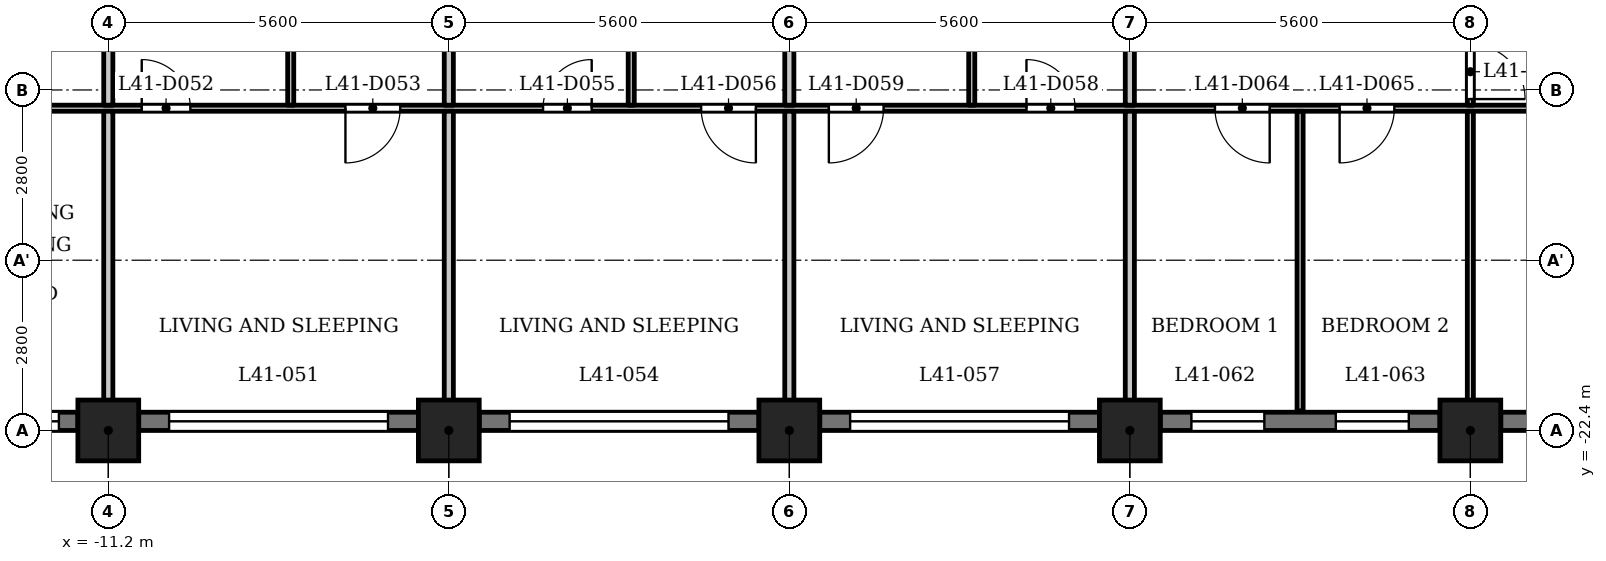
"""IFC4 building model, lengths in metres.
Left out: names, types, materials, properties, quantities, classifications, styles, units other than length and angle.
Written with IfcOpenShell. Run it as: python <this file> out.ifc"""

import sys

from ifc_helpers import new_model, si_unit, direction, frame, frame_2d, origin, origin_2d, place, context, subcontext, project, spatial, rectangle, extrude, element, fill, save


model = new_model("IFC4")
c1 = context("Model", 3, precision=1e-05, world=origin(), true_north=direction((0.0, 1.0)))
c2 = subcontext(c1, "Body", "Model", "MODEL_VIEW")
j1 = project(units=[si_unit("LENGTHUNIT", "METRE"), si_unit("PLANEANGLEUNIT", "RADIAN")], contexts=[c1])
p1 = place(None, origin())
s1 = spatial("IfcSite", under=j1, at=p1, CompositionType="ELEMENT")
p2 = place(p1, origin())
s2 = spatial("IfcBuilding", under=s1, at=p2, CompositionType="ELEMENT")
p3 = place(p2, frame((0.0, 0.0, 160.6)))
s3 = spatial("IfcBuildingStorey", under=s2, at=p3, CompositionType="ELEMENT", Elevation=160.6)
for number, where, z_axis, x_axis in (
    (1, (-11.2, -22.4, 0.0), (0.0, 0.0, 1.0), (1.0, 0.0, 0.0)),
    (2, (-5.6, -22.4, 0.0), (0.0, 0.0, 1.0), (1.0, 0.0, 0.0)),
    (3, (0.0, -22.4, 0.0), (0.0, 0.0, 1.0), (1.0, 0.0, 0.0)),
    (4, (5.6, -22.4, 0.0), (0.0, 0.0, 1.0), (1.0, 0.0, 0.0)),
    (5, (11.2, -22.4, 0.0), (0.0, 0.0, 1.0), (1.0, 0.0, 0.0)),
):
    element("IfcColumn", number, at=place(p3, frame(where, z_axis=z_axis, x_axis=x_axis)), inside=s3, PredefinedType="COLUMN", context=c2, shape_type="SweptSolid", body=[
        extrude(rectangle(XDim=1.0, YDim=1.0, at=origin_2d()), origin(), (0.0, 0.0, 1.0), 3.5),
    ])
p4 = place(p3, frame((-16.3, -22.25, 0.0), z_axis=(0.0, 0.0, 1.0), x_axis=(1.0, 0.0, 0.0)))
e6 = element("IfcWall", 6, at=p4, inside=s3, PredefinedType="SOLIDWALL", context=c2, shape_type="SweptSolid", body=[
    extrude(rectangle(XDim=4.6, YDim=0.3, at=frame_2d((2.3, 0.0))), origin(), (0.0, 0.0, 1.0), 2.45),
])
p5 = place(p4, frame((0.413, 0.0, 0.6)))
e7 = element("IfcOpeningElement", 7, at=p5, cuts=e6, PredefinedType="OPENING", context=c2, shape_type="SweptSolid", body=[
    extrude(rectangle(XDim=1.2, YDim=1.55, at=frame_2d((0.6, 0.775))), frame((0.0, 0.16, 0.0), z_axis=(0.0, -1.0, 0.0), x_axis=(1.0, 0.0, 0.0)), (0.0, 0.0, 1.0), 0.32),
])
p6 = place(p4, frame((2.488, 0.0, 0.9)))
e8 = element("IfcOpeningElement", 8, at=p6, cuts=e6, PredefinedType="OPENING", context=c2, shape_type="SweptSolid", body=[
    extrude(rectangle(XDim=1.8, YDim=1.25, at=frame_2d((0.9, 0.625))), frame((0.0, 0.16, 0.0), z_axis=(0.0, -1.0, 0.0), x_axis=(1.0, 0.0, 0.0)), (0.0, 0.0, 1.0), 0.32),
])
p7 = place(p3, frame((-10.7, -22.25, 0.0), z_axis=(0.0, 0.0, 1.0), x_axis=(1.0, 0.0, 0.0)))
e9 = element("IfcWall", 9, at=p7, inside=s3, PredefinedType="SOLIDWALL", context=c2, shape_type="SweptSolid", body=[
    extrude(rectangle(XDim=4.6, YDim=0.3, at=frame_2d((2.3, 0.0))), origin(), (0.0, 0.0, 1.0), 2.45),
])
p8 = place(p7, frame((0.5, 0.0, 1.2)))
e10 = element("IfcOpeningElement", 10, at=p8, cuts=e9, PredefinedType="OPENING", context=c2, shape_type="SweptSolid", body=[
    extrude(rectangle(XDim=3.6, YDim=0.95, at=frame_2d((1.8, 0.475))), frame((0.0, 0.16, 0.0), z_axis=(0.0, -1.0, 0.0), x_axis=(1.0, 0.0, 0.0)), (0.0, 0.0, 1.0), 0.32),
])
p9 = place(p3, frame((-5.1, -22.25, 0.0), z_axis=(0.0, 0.0, 1.0), x_axis=(1.0, 0.0, 0.0)))
e11 = element("IfcWall", 11, at=p9, inside=s3, PredefinedType="SOLIDWALL", context=c2, shape_type="SweptSolid", body=[
    extrude(rectangle(XDim=4.6, YDim=0.3, at=frame_2d((2.3, 0.0))), origin(), (0.0, 0.0, 1.0), 2.45),
])
p10 = place(p9, frame((0.5, 0.0, 1.2)))
e12 = element("IfcOpeningElement", 12, at=p10, cuts=e11, PredefinedType="OPENING", context=c2, shape_type="SweptSolid", body=[
    extrude(rectangle(XDim=3.6, YDim=0.95, at=frame_2d((1.8, 0.475))), frame((0.0, 0.16, 0.0), z_axis=(0.0, -1.0, 0.0), x_axis=(1.0, 0.0, 0.0)), (0.0, 0.0, 1.0), 0.32),
])
p11 = place(p3, frame((0.5, -22.25, 0.0), z_axis=(0.0, 0.0, 1.0), x_axis=(1.0, 0.0, 0.0)))
e13 = element("IfcWall", 13, at=p11, inside=s3, PredefinedType="SOLIDWALL", context=c2, shape_type="SweptSolid", body=[
    extrude(rectangle(XDim=4.6, YDim=0.3, at=frame_2d((2.3, 0.0))), origin(), (0.0, 0.0, 1.0), 2.45),
])
p12 = place(p11, frame((0.5, 0.0, 1.2)))
e14 = element("IfcOpeningElement", 14, at=p12, cuts=e13, PredefinedType="OPENING", context=c2, shape_type="SweptSolid", body=[
    extrude(rectangle(XDim=3.6, YDim=0.95, at=frame_2d((1.8, 0.475))), frame((0.0, 0.16, 0.0), z_axis=(0.0, -1.0, 0.0), x_axis=(1.0, 0.0, 0.0)), (0.0, 0.0, 1.0), 0.32),
])
p13 = place(p3, frame((6.1, -22.25, 0.0), z_axis=(0.0, 0.0, 1.0), x_axis=(1.0, 0.0, 0.0)))
e15 = element("IfcWall", 15, at=p13, inside=s3, PredefinedType="SOLIDWALL", context=c2, shape_type="SweptSolid", body=[
    extrude(rectangle(XDim=4.6, YDim=0.3, at=frame_2d((2.3, 0.0))), origin(), (0.0, 0.0, 1.0), 2.45),
])
p14 = place(p13, frame((0.512, 0.0, 0.6)))
e16 = element("IfcOpeningElement", 16, at=p14, cuts=e15, PredefinedType="OPENING", context=c2, shape_type="SweptSolid", body=[
    extrude(rectangle(XDim=1.2, YDim=1.55, at=frame_2d((0.6, 0.775))), frame((0.0, 0.16, 0.0), z_axis=(0.0, -1.0, 0.0), x_axis=(1.0, 0.0, 0.0)), (0.0, 0.0, 1.0), 0.32),
])
p15 = place(p13, frame((2.887, 0.0, 0.6)))
e17 = element("IfcOpeningElement", 17, at=p15, cuts=e15, PredefinedType="OPENING", context=c2, shape_type="SweptSolid", body=[
    extrude(rectangle(XDim=1.2, YDim=1.55, at=frame_2d((0.6, 0.775))), frame((0.0, 0.16, 0.0), z_axis=(0.0, -1.0, 0.0), x_axis=(1.0, 0.0, 0.0)), (0.0, 0.0, 1.0), 0.32),
])
p16 = place(p3, frame((11.7, -22.25, 0.0), z_axis=(0.0, 0.0, 1.0), x_axis=(1.0, 0.0, 0.0)))
e18 = element("IfcWall", 18, at=p16, inside=s3, PredefinedType="SOLIDWALL", context=c2, shape_type="SweptSolid", body=[
    extrude(rectangle(XDim=4.6, YDim=0.3, at=frame_2d((2.3, 0.0))), origin(), (0.0, 0.0, 1.0), 2.45),
])
p17 = place(p16, frame((0.5, 0.0, 1.2)))
e19 = element("IfcOpeningElement", 19, at=p17, cuts=e18, PredefinedType="OPENING", context=c2, shape_type="SweptSolid", body=[
    extrude(rectangle(XDim=3.6, YDim=0.95, at=frame_2d((1.8, 0.475))), frame((0.0, 0.16, 0.0), z_axis=(0.0, -1.0, 0.0), x_axis=(1.0, 0.0, 0.0)), (0.0, 0.0, 1.0), 0.32),
])
p18 = place(p3, frame((-16.725, -17.1, 0.0), z_axis=(0.0, 0.0, 1.0), x_axis=(1.0, 0.0, 0.0)))
e20 = element("IfcWall", 20, at=p18, inside=s3, PredefinedType="PARTITIONING", context=c2, shape_type="SweptSolid", body=[
    extrude(rectangle(XDim=33.45, YDim=0.1, at=frame_2d((16.725, 0.0))), origin(), (0.0, 0.0, 1.0), 3.2),
])
p19 = place(p18, frame((0.725, 0.0, 0.0)))
e21 = element("IfcOpeningElement", 21, at=p19, cuts=e20, PredefinedType="OPENING", context=c2, shape_type="SweptSolid", body=[
    extrude(rectangle(XDim=0.8, YDim=2.1, at=frame_2d((0.4, 1.05))), frame((0.0, 0.06, 0.0), z_axis=(0.0, -1.0, 0.0), x_axis=(1.0, 0.0, 0.0)), (0.0, 0.0, 1.0), 0.12),
])
p20 = place(p18, frame((3.175, 0.0, 0.0)))
e22 = element("IfcOpeningElement", 22, at=p20, cuts=e20, PredefinedType="OPENING", context=c2, shape_type="SweptSolid", body=[
    extrude(rectangle(XDim=0.9, YDim=2.1, at=frame_2d((0.45, 1.05))), frame((0.0, 0.06, 0.0), z_axis=(0.0, -1.0, 0.0), x_axis=(1.0, 0.0, 0.0)), (0.0, 0.0, 1.0), 0.12),
])
p21 = place(p18, frame((6.075, 0.0, 0.0)))
e23 = element("IfcOpeningElement", 23, at=p21, cuts=e20, PredefinedType="OPENING", context=c2, shape_type="SweptSolid", body=[
    extrude(rectangle(XDim=0.8, YDim=2.1, at=frame_2d((0.4, 1.05))), frame((0.0, 0.06, 0.0), z_axis=(0.0, -1.0, 0.0), x_axis=(1.0, 0.0, 0.0)), (0.0, 0.0, 1.0), 0.12),
])
p22 = place(p18, frame((9.425, 0.0, 0.0)))
e24 = element("IfcOpeningElement", 24, at=p22, cuts=e20, PredefinedType="OPENING", context=c2, shape_type="SweptSolid", body=[
    extrude(rectangle(XDim=0.9, YDim=2.1, at=frame_2d((0.45, 1.05))), frame((0.0, 0.06, 0.0), z_axis=(0.0, -1.0, 0.0), x_axis=(1.0, 0.0, 0.0)), (0.0, 0.0, 1.0), 0.12),
])
p23 = place(p18, frame((12.675, 0.0, 0.0)))
e25 = element("IfcOpeningElement", 25, at=p23, cuts=e20, PredefinedType="OPENING", context=c2, shape_type="SweptSolid", body=[
    extrude(rectangle(XDim=0.8, YDim=2.1, at=frame_2d((0.4, 1.05))), frame((0.0, 0.06, 0.0), z_axis=(0.0, -1.0, 0.0), x_axis=(1.0, 0.0, 0.0)), (0.0, 0.0, 1.0), 0.12),
])
p24 = place(p18, frame((15.275, 0.0, 0.0)))
e26 = element("IfcOpeningElement", 26, at=p24, cuts=e20, PredefinedType="OPENING", context=c2, shape_type="SweptSolid", body=[
    extrude(rectangle(XDim=0.9, YDim=2.1, at=frame_2d((0.45, 1.05))), frame((0.0, 0.06, 0.0), z_axis=(0.0, -1.0, 0.0), x_axis=(1.0, 0.0, 0.0)), (0.0, 0.0, 1.0), 0.12),
])
p25 = place(p18, frame((20.625, 0.0, 0.0)))
e27 = element("IfcOpeningElement", 27, at=p25, cuts=e20, PredefinedType="OPENING", context=c2, shape_type="SweptSolid", body=[
    extrude(rectangle(XDim=0.8, YDim=2.1, at=frame_2d((0.4, 1.05))), frame((0.0, 0.06, 0.0), z_axis=(0.0, -1.0, 0.0), x_axis=(1.0, 0.0, 0.0)), (0.0, 0.0, 1.0), 0.12),
])
p26 = place(p18, frame((17.375, 0.0, 0.0)))
e28 = element("IfcOpeningElement", 28, at=p26, cuts=e20, PredefinedType="OPENING", context=c2, shape_type="SweptSolid", body=[
    extrude(rectangle(XDim=0.9, YDim=2.1, at=frame_2d((0.45, 1.05))), frame((0.0, 0.06, 0.0), z_axis=(0.0, -1.0, 0.0), x_axis=(1.0, 0.0, 0.0)), (0.0, 0.0, 1.0), 0.12),
])
p27 = place(p18, frame((31.075, 0.0, 0.0)))
e29 = element("IfcOpeningElement", 29, at=p27, cuts=e20, PredefinedType="OPENING", context=c2, shape_type="SweptSolid", body=[
    extrude(rectangle(XDim=0.8, YDim=2.1, at=frame_2d((0.4, 1.05))), frame((0.0, 0.06, 0.0), z_axis=(0.0, -1.0, 0.0), x_axis=(1.0, 0.0, 0.0)), (0.0, 0.0, 1.0), 0.12),
])
p28 = place(p18, frame((29.325, 0.0, 0.0)))
e30 = element("IfcOpeningElement", 30, at=p28, cuts=e20, PredefinedType="OPENING", context=c2, shape_type="SweptSolid", body=[
    extrude(rectangle(XDim=0.9, YDim=2.1, at=frame_2d((0.45, 1.05))), frame((0.0, 0.06, 0.0), z_axis=(0.0, -1.0, 0.0), x_axis=(1.0, 0.0, 0.0)), (0.0, 0.0, 1.0), 0.12),
])
p29 = place(p18, frame((23.725, 0.0, 0.0)))
e31 = element("IfcOpeningElement", 31, at=p29, cuts=e20, PredefinedType="OPENING", context=c2, shape_type="SweptSolid", body=[
    extrude(rectangle(XDim=0.9, YDim=2.1, at=frame_2d((0.45, 1.05))), frame((0.0, 0.06, 0.0), z_axis=(0.0, -1.0, 0.0), x_axis=(1.0, 0.0, 0.0)), (0.0, 0.0, 1.0), 0.12),
])
p30 = place(p18, frame((25.775, 0.0, 0.0)))
e32 = element("IfcOpeningElement", 32, at=p30, cuts=e20, PredefinedType="OPENING", context=c2, shape_type="SweptSolid", body=[
    extrude(rectangle(XDim=0.9, YDim=2.1, at=frame_2d((0.45, 1.05))), frame((0.0, 0.06, 0.0), z_axis=(0.0, -1.0, 0.0), x_axis=(1.0, 0.0, 0.0)), (0.0, 0.0, 1.0), 0.12),
])
p31 = place(p3, frame((-11.2, -22.88, 0.0), z_axis=(0.0, 0.0, 1.0), x_axis=(0.0, 1.0, 0.0)))
e33 = element("IfcWall", 33, at=p31, inside=s3, PredefinedType="PARTITIONING", context=c2, shape_type="SweptSolid", body=[
    extrude(rectangle(XDim=5.73, YDim=0.15, at=frame_2d((2.865, 0.0))), origin(), (0.0, 0.0, 1.0), 3.2),
])
p32 = place(p3, frame((-11.2, -17.05, 0.0), z_axis=(0.0, 0.0, 1.0), x_axis=(0.0, 1.0, 0.0)))
e34 = element("IfcWall", 34, at=p32, inside=s3, PredefinedType="PARTITIONING", context=c2, shape_type="SweptSolid", body=[
    extrude(rectangle(XDim=3.775, YDim=0.15, at=frame_2d((1.888, 0.0))), origin(), (0.0, 0.0, 1.0), 3.2),
])
p33 = place(p3, frame((-8.2, -17.05, 0.0), z_axis=(0.0, 0.0, 1.0), x_axis=(0.0, 1.0, 0.0)))
e35 = element("IfcWall", 35, at=p33, inside=s3, PredefinedType="PARTITIONING", context=c2, shape_type="SweptSolid", body=[
    extrude(rectangle(XDim=3.775, YDim=0.1, at=frame_2d((1.888, 0.0))), origin(), (0.0, 0.0, 1.0), 3.2),
])
p34 = place(p3, frame((-5.6, -22.88, 0.0), z_axis=(0.0, 0.0, 1.0), x_axis=(0.0, 1.0, 0.0)))
e36 = element("IfcWall", 36, at=p34, inside=s3, PredefinedType="PARTITIONING", context=c2, shape_type="SweptSolid", body=[
    extrude(rectangle(XDim=5.73, YDim=0.15, at=frame_2d((2.865, 0.0))), origin(), (0.0, 0.0, 1.0), 3.2),
])
p35 = place(p3, frame((-5.6, -17.05, 0.0), z_axis=(0.0, 0.0, 1.0), x_axis=(0.0, 1.0, 0.0)))
e37 = element("IfcWall", 37, at=p35, inside=s3, PredefinedType="PARTITIONING", context=c2, shape_type="SweptSolid", body=[
    extrude(rectangle(XDim=3.775, YDim=0.15, at=frame_2d((1.888, 0.0))), origin(), (0.0, 0.0, 1.0), 3.2),
])
p36 = place(p3, frame((-2.6, -17.05, 0.0), z_axis=(0.0, 0.0, 1.0), x_axis=(0.0, 1.0, 0.0)))
e38 = element("IfcWall", 38, at=p36, inside=s3, PredefinedType="PARTITIONING", context=c2, shape_type="SweptSolid", body=[
    extrude(rectangle(XDim=3.775, YDim=0.1, at=frame_2d((1.888, 0.0))), origin(), (0.0, 0.0, 1.0), 3.2),
])
p37 = place(p3, frame((0.0, -22.88, 0.0), z_axis=(0.0, 0.0, 1.0), x_axis=(0.0, 1.0, 0.0)))
e39 = element("IfcWall", 39, at=p37, inside=s3, PredefinedType="PARTITIONING", context=c2, shape_type="SweptSolid", body=[
    extrude(rectangle(XDim=5.73, YDim=0.15, at=frame_2d((2.865, 0.0))), origin(), (0.0, 0.0, 1.0), 3.2),
])
p38 = place(p3, frame((0.0, -17.05, 0.0), z_axis=(0.0, 0.0, 1.0), x_axis=(0.0, 1.0, 0.0)))
e40 = element("IfcWall", 40, at=p38, inside=s3, PredefinedType="PARTITIONING", context=c2, shape_type="SweptSolid", body=[
    extrude(rectangle(XDim=3.775, YDim=0.15, at=frame_2d((1.888, 0.0))), origin(), (0.0, 0.0, 1.0), 3.2),
])
p39 = place(p3, frame((3.0, -17.05, 0.0), z_axis=(0.0, 0.0, 1.0), x_axis=(0.0, 1.0, 0.0)))
e41 = element("IfcWall", 41, at=p39, inside=s3, PredefinedType="PARTITIONING", context=c2, shape_type="SweptSolid", body=[
    extrude(rectangle(XDim=3.775, YDim=0.1, at=frame_2d((1.888, 0.0))), origin(), (0.0, 0.0, 1.0), 3.2),
])
p40 = place(p3, frame((5.6, -22.88, 0.0), z_axis=(0.0, 0.0, 1.0), x_axis=(0.0, 1.0, 0.0)))
e42 = element("IfcWall", 42, at=p40, inside=s3, PredefinedType="PARTITIONING", context=c2, shape_type="SweptSolid", body=[
    extrude(rectangle(XDim=5.73, YDim=0.15, at=frame_2d((2.865, 0.0))), origin(), (0.0, 0.0, 1.0), 3.2),
])
p41 = place(p3, frame((5.6, -17.05, 0.0), z_axis=(0.0, 0.0, 1.0), x_axis=(0.0, 1.0, 0.0)))
e43 = element("IfcWall", 43, at=p41, inside=s3, PredefinedType="PARTITIONING", context=c2, shape_type="SweptSolid", body=[
    extrude(rectangle(XDim=3.775, YDim=0.15, at=frame_2d((1.888, 0.0))), origin(), (0.0, 0.0, 1.0), 3.2),
])
p42 = place(p3, frame((8.4, -22.08, 0.0), z_axis=(0.0, 0.0, 1.0), x_axis=(0.0, 1.0, 0.0)))
e44 = element("IfcWall", 44, at=p42, inside=s3, PredefinedType="PARTITIONING", context=c2, shape_type="SweptSolid", body=[
    extrude(rectangle(XDim=4.93, YDim=0.1, at=frame_2d((2.465, 0.0))), origin(), (0.0, 0.0, 1.0), 3.2),
])
p43 = place(p3, frame((11.2, -22.88, 0.0), z_axis=(0.0, 0.0, 1.0), x_axis=(0.0, 1.0, 0.0)))
e45 = element("IfcWall", 45, at=p43, inside=s3, PredefinedType="PARTITIONING", context=c2, shape_type="SweptSolid", body=[
    extrude(rectangle(XDim=5.73, YDim=0.1, at=frame_2d((2.865, 0.0))), origin(), (0.0, 0.0, 1.0), 3.2),
])
p44 = place(p3, frame((11.2, -17.05, 0.0), z_axis=(0.0, 0.0, 1.0), x_axis=(0.0, 1.0, 0.0)))
e46 = element("IfcWall", 46, at=p44, inside=s3, PredefinedType="PARTITIONING", context=c2, shape_type="SweptSolid", body=[
    extrude(rectangle(XDim=3.775, YDim=0.1, at=frame_2d((1.888, 0.0))), origin(), (0.0, 0.0, 1.0), 3.2),
])
p45 = place(p44, frame((0.1, 0.0, 0.0)))
e47 = element("IfcOpeningElement", 47, at=p45, cuts=e46, PredefinedType="OPENING", context=c2, shape_type="SweptSolid", body=[
    extrude(rectangle(XDim=0.9, YDim=2.1, at=frame_2d((0.45, 1.05))), frame((0.0, 0.06, 0.0), z_axis=(0.0, -1.0, 0.0), x_axis=(1.0, 0.0, 0.0)), (0.0, 0.0, 1.0), 0.12),
])
p46 = place(p21, origin())
e48 = element("IfcDoor", 48, at=p46, inside=s3, OperationType="SINGLE_SWING_RIGHT", PredefinedType="DOOR", context=c2, shape_type="SweptSolid", body=[
    extrude(rectangle(XDim=0.8, YDim=2.1, at=frame_2d((0.4, 1.05))), frame((0.0, 0.025, 0.0), z_axis=(0.0, -1.0, 0.0), x_axis=(1.0, 0.0, 0.0)), (0.0, 0.0, 1.0), 0.05),
])
fill(e23, e48)
p47 = place(p22, origin())
e49 = element("IfcDoor", 49, at=p47, inside=s3, OperationType="SINGLE_SWING_LEFT", PredefinedType="DOOR", context=c2, shape_type="SweptSolid", body=[
    extrude(rectangle(XDim=0.9, YDim=2.1, at=frame_2d((0.45, 1.05))), frame((0.0, 0.025, 0.0), z_axis=(0.0, -1.0, 0.0), x_axis=(1.0, 0.0, 0.0)), (0.0, 0.0, 1.0), 0.05),
])
fill(e24, e49)
p48 = place(p23, origin())
e50 = element("IfcDoor", 50, at=p48, inside=s3, OperationType="SINGLE_SWING_LEFT", PredefinedType="DOOR", context=c2, shape_type="SweptSolid", body=[
    extrude(rectangle(XDim=0.8, YDim=2.1, at=frame_2d((0.4, 1.05))), frame((0.0, 0.025, 0.0), z_axis=(0.0, -1.0, 0.0), x_axis=(1.0, 0.0, 0.0)), (0.0, 0.0, 1.0), 0.05),
])
fill(e25, e50)
p49 = place(p24, origin())
e51 = element("IfcDoor", 51, at=p49, inside=s3, OperationType="SINGLE_SWING_RIGHT", PredefinedType="DOOR", context=c2, shape_type="SweptSolid", body=[
    extrude(rectangle(XDim=0.9, YDim=2.1, at=frame_2d((0.45, 1.05))), frame((0.0, 0.025, 0.0), z_axis=(0.0, -1.0, 0.0), x_axis=(1.0, 0.0, 0.0)), (0.0, 0.0, 1.0), 0.05),
])
fill(e26, e51)
p50 = place(p25, origin())
e52 = element("IfcDoor", 52, at=p50, inside=s3, OperationType="SINGLE_SWING_RIGHT", PredefinedType="DOOR", context=c2, shape_type="SweptSolid", body=[
    extrude(rectangle(XDim=0.8, YDim=2.1, at=frame_2d((0.4, 1.05))), frame((0.0, 0.025, 0.0), z_axis=(0.0, -1.0, 0.0), x_axis=(1.0, 0.0, 0.0)), (0.0, 0.0, 1.0), 0.05),
])
fill(e27, e52)
p51 = place(p26, origin())
e53 = element("IfcDoor", 53, at=p51, inside=s3, OperationType="SINGLE_SWING_LEFT", PredefinedType="DOOR", context=c2, shape_type="SweptSolid", body=[
    extrude(rectangle(XDim=0.9, YDim=2.1, at=frame_2d((0.45, 1.05))), frame((0.0, 0.025, 0.0), z_axis=(0.0, -1.0, 0.0), x_axis=(1.0, 0.0, 0.0)), (0.0, 0.0, 1.0), 0.05),
])
fill(e28, e53)
p52 = place(p45, origin())
e54 = element("IfcDoor", 54, at=p52, inside=s3, OperationType="SINGLE_SWING_LEFT", PredefinedType="DOOR", context=c2, shape_type="SweptSolid", body=[
    extrude(rectangle(XDim=0.9, YDim=2.1, at=frame_2d((0.45, 1.05))), frame((0.0, 0.025, 0.0), z_axis=(0.0, -1.0, 0.0), x_axis=(1.0, 0.0, 0.0)), (0.0, 0.0, 1.0), 0.05),
])
fill(e47, e54)
p53 = place(p29, origin())
e55 = element("IfcDoor", 55, at=p53, inside=s3, OperationType="SINGLE_SWING_RIGHT", PredefinedType="DOOR", context=c2, shape_type="SweptSolid", body=[
    extrude(rectangle(XDim=0.9, YDim=2.1, at=frame_2d((0.45, 1.05))), frame((0.0, 0.025, 0.0), z_axis=(0.0, -1.0, 0.0), x_axis=(1.0, 0.0, 0.0)), (0.0, 0.0, 1.0), 0.05),
])
fill(e31, e55)
p54 = place(p30, origin())
e56 = element("IfcDoor", 56, at=p54, inside=s3, OperationType="SINGLE_SWING_LEFT", PredefinedType="DOOR", context=c2, shape_type="SweptSolid", body=[
    extrude(rectangle(XDim=0.9, YDim=2.1, at=frame_2d((0.45, 1.05))), frame((0.0, 0.025, 0.0), z_axis=(0.0, -1.0, 0.0), x_axis=(1.0, 0.0, 0.0)), (0.0, 0.0, 1.0), 0.05),
])
fill(e32, e56)
p55 = place(p6, origin())
e57 = element("IfcWindow", 57, at=p55, inside=s3, PartitioningType="SINGLE_PANEL", PredefinedType="WINDOW", context=c2, shape_type="SweptSolid", body=[
    extrude(rectangle(XDim=1.8, YDim=1.25, at=frame_2d((0.9, 0.625))), frame((0.0, 0.03, 0.0), z_axis=(0.0, -1.0, 0.0), x_axis=(1.0, 0.0, 0.0)), (0.0, 0.0, 1.0), 0.06),
])
fill(e8, e57)
p56 = place(p8, origin())
e58 = element("IfcWindow", 58, at=p56, inside=s3, PartitioningType="SINGLE_PANEL", PredefinedType="WINDOW", context=c2, shape_type="SweptSolid", body=[
    extrude(rectangle(XDim=3.6, YDim=0.95, at=frame_2d((1.8, 0.475))), frame((0.0, 0.03, 0.0), z_axis=(0.0, -1.0, 0.0), x_axis=(1.0, 0.0, 0.0)), (0.0, 0.0, 1.0), 0.06),
])
fill(e10, e58)
p57 = place(p10, origin())
e59 = element("IfcWindow", 59, at=p57, inside=s3, PartitioningType="SINGLE_PANEL", PredefinedType="WINDOW", context=c2, shape_type="SweptSolid", body=[
    extrude(rectangle(XDim=3.6, YDim=0.95, at=frame_2d((1.8, 0.475))), frame((0.0, 0.03, 0.0), z_axis=(0.0, -1.0, 0.0), x_axis=(1.0, 0.0, 0.0)), (0.0, 0.0, 1.0), 0.06),
])
fill(e12, e59)
p58 = place(p12, origin())
e60 = element("IfcWindow", 60, at=p58, inside=s3, PartitioningType="SINGLE_PANEL", PredefinedType="WINDOW", context=c2, shape_type="SweptSolid", body=[
    extrude(rectangle(XDim=3.6, YDim=0.95, at=frame_2d((1.8, 0.475))), frame((0.0, 0.03, 0.0), z_axis=(0.0, -1.0, 0.0), x_axis=(1.0, 0.0, 0.0)), (0.0, 0.0, 1.0), 0.06),
])
fill(e14, e60)
p59 = place(p14, origin())
e61 = element("IfcWindow", 61, at=p59, inside=s3, PartitioningType="SINGLE_PANEL", PredefinedType="WINDOW", context=c2, shape_type="SweptSolid", body=[
    extrude(rectangle(XDim=1.2, YDim=1.55, at=frame_2d((0.6, 0.775))), frame((0.0, 0.03, 0.0), z_axis=(0.0, -1.0, 0.0), x_axis=(1.0, 0.0, 0.0)), (0.0, 0.0, 1.0), 0.06),
])
fill(e16, e61)
p60 = place(p15, origin())
e62 = element("IfcWindow", 62, at=p60, inside=s3, PartitioningType="SINGLE_PANEL", PredefinedType="WINDOW", context=c2, shape_type="SweptSolid", body=[
    extrude(rectangle(XDim=1.2, YDim=1.55, at=frame_2d((0.6, 0.775))), frame((0.0, 0.03, 0.0), z_axis=(0.0, -1.0, 0.0), x_axis=(1.0, 0.0, 0.0)), (0.0, 0.0, 1.0), 0.06),
])
fill(e17, e62)
save(model, sys.argv[1])
